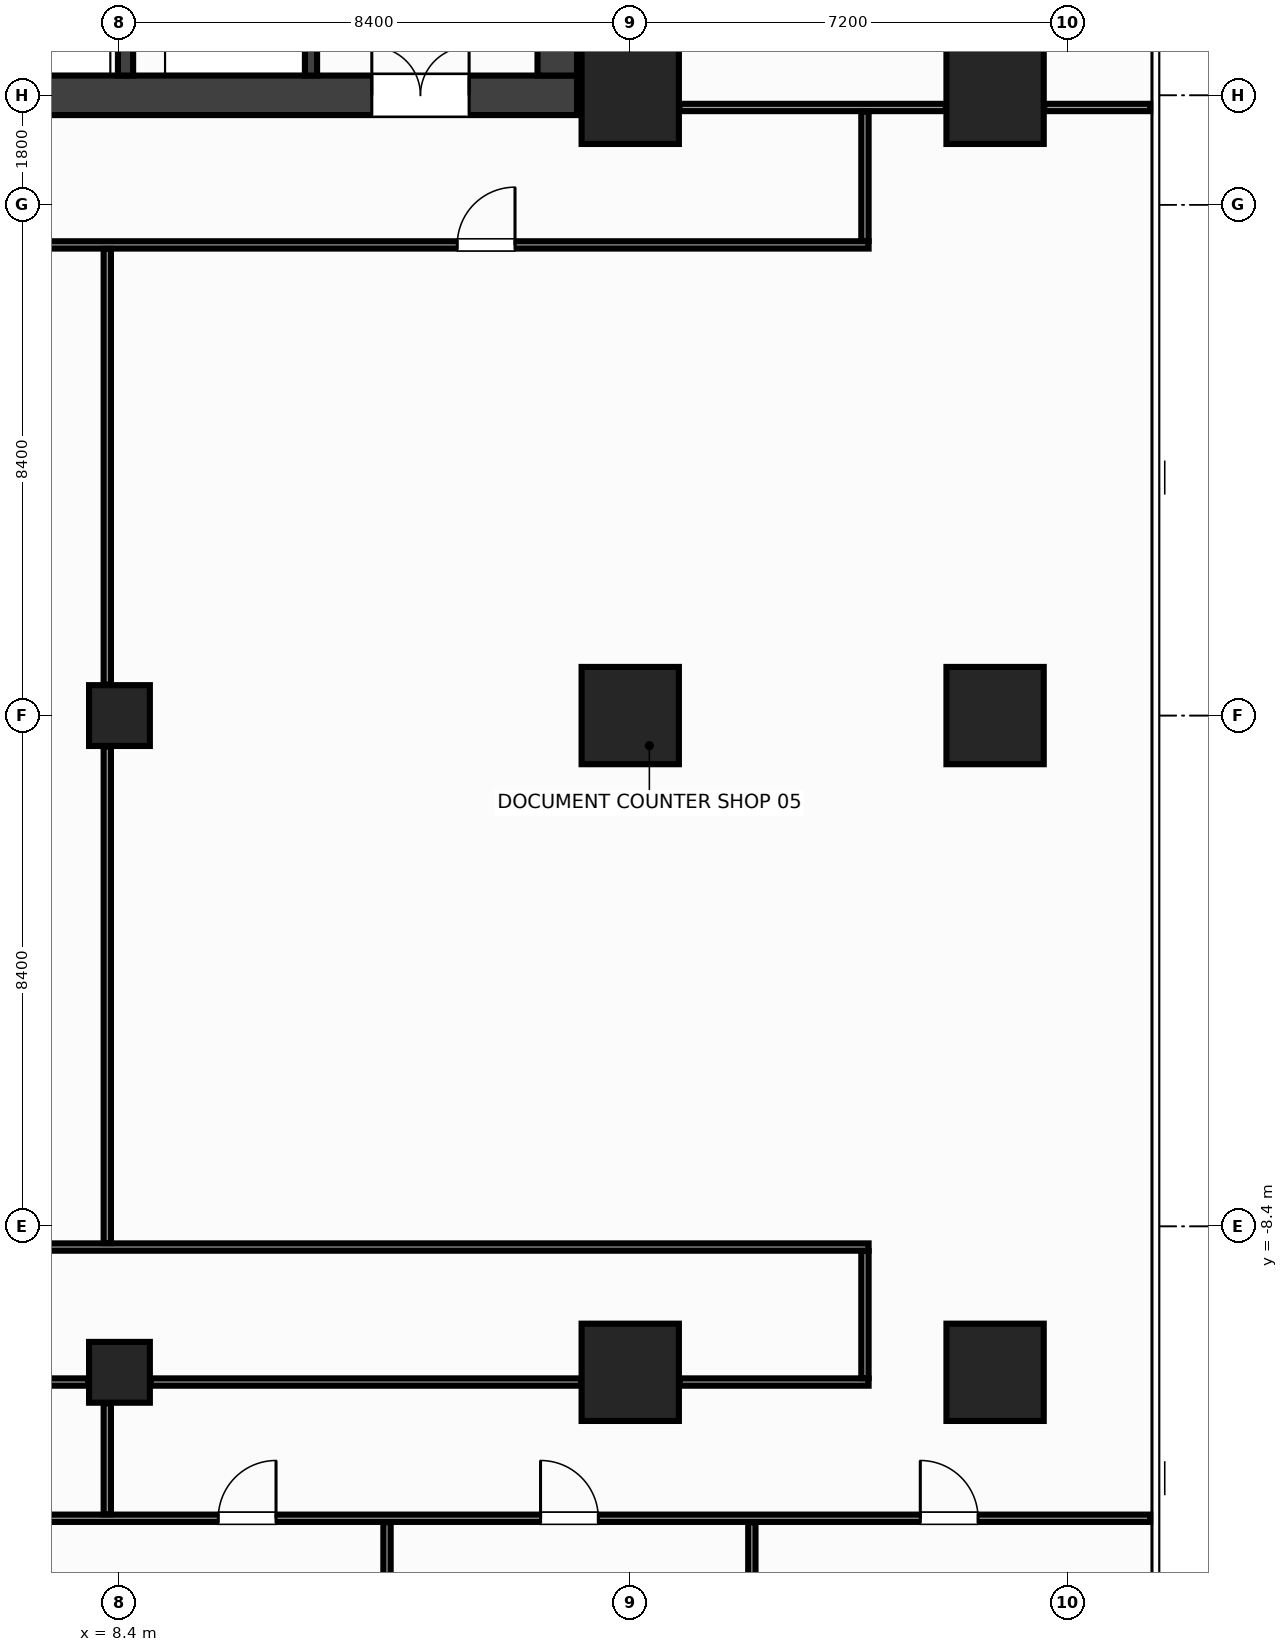
"""IFC4 building model, lengths in metres.
Left out: names, types, materials, properties, quantities, classifications, styles, units other than length and angle.
Written with IfcOpenShell. Run it as: python <this file> out.ifc"""

import sys

from ifc_helpers import new_model, si_unit, direction, frame, frame_2d, origin, origin_2d, place, context, subcontext, project, spatial, rectangle, hollow_rectangle, extrude, source, transform, mapped, element, fill, save


model = new_model("IFC4")
c1 = context("Model", 3, precision=1e-05, world=origin(), true_north=direction((0.0, 1.0)))
c2 = subcontext(c1, "Body", "Model", "MODEL_VIEW")
j1 = project(units=[si_unit("LENGTHUNIT", "METRE"), si_unit("PLANEANGLEUNIT", "RADIAN")], contexts=[c1])
p1 = place(None, origin())
s1 = spatial("IfcSite", under=j1, at=p1, CompositionType="ELEMENT")
p2 = place(p1, origin())
s2 = spatial("IfcBuilding", under=s1, at=p2, CompositionType="ELEMENT")
p3 = place(p2, frame((0.0, 0.0, 84.8)))
s3 = spatial("IfcBuildingStorey", under=s2, at=p3, CompositionType="ELEMENT", Elevation=84.8)
m1 = source(origin(), c2, "Body", "SweptSolid", [
    extrude(rectangle(XDim=31.85, YDim=0.65, at=frame_2d((15.925, 0.0))), origin(), (0.0, 0.0, 1.0), 3.6),
])
p4 = place(p3, frame((-15.925, 10.2, 0.0), z_axis=(0.0, 0.0, 1.0), x_axis=(1.0, 0.0, 0.0)))
e1 = element("IfcWall", 1, at=p4, inside=s3, PredefinedType="SHEAR", context=c2, shape_type="MappedRepresentation", body=[
    mapped(m1, transform((0.0, 0.0, 0.0), x_axis=(1.0, 0.0, 0.0), y_axis=(0.0, 1.0, 0.0), z_axis=(0.0, 0.0, 1.0), scale=1.0)),
])
p5 = place(p4, frame((1.775, 0.0, 0.0)))
e2 = element("IfcOpeningElement", 2, at=p5, cuts=e1, PredefinedType="OPENING", context=c2, shape_type="SweptSolid", body=[
    extrude(rectangle(XDim=1.6, YDim=2.15, at=frame_2d((0.8, 1.075))), frame((0.0, 0.337, 0.0), z_axis=(0.0, -1.0, 0.0), x_axis=(1.0, 0.0, 0.0)), (0.0, 0.0, 1.0), 0.674),
])
p6 = place(p4, frame((28.475, 0.0, 0.0)))
e3 = element("IfcOpeningElement", 3, at=p6, cuts=e1, PredefinedType="OPENING", context=c2, shape_type="SweptSolid", body=[
    extrude(rectangle(XDim=1.6, YDim=2.15, at=frame_2d((0.8, 1.075))), frame((0.0, 0.337, 0.0), z_axis=(0.0, -1.0, 0.0), x_axis=(1.0, 0.0, 0.0)), (0.0, 0.0, 1.0), 0.674),
])
p7 = place(p4, frame((15.175, 0.0, 0.0)))
e4 = element("IfcOpeningElement", 4, at=p7, cuts=e1, PredefinedType="OPENING", context=c2, shape_type="SweptSolid", body=[
    extrude(rectangle(XDim=1.5, YDim=2.2, at=frame_2d((0.75, 1.1))), frame((0.0, 0.337, 0.0), z_axis=(0.0, -1.0, 0.0), x_axis=(1.0, 0.0, 0.0)), (0.0, 0.0, 1.0), 0.674),
])
m2 = source(origin(), c2, "Body", "SweptSolid", [
    extrude(rectangle(XDim=12.95, YDim=0.65, at=frame_2d((6.475, 0.0))), origin(), (0.0, 0.0, 1.0), 3.6),
])
p8 = place(p3, frame((15.6, 10.525, 0.0), z_axis=(0.0, 0.0, 1.0), x_axis=(0.0, 1.0, 0.0)))
e5 = element("IfcWall", 5, at=p8, inside=s3, PredefinedType="SHEAR", context=c2, shape_type="MappedRepresentation", body=[
    mapped(m2, transform((0.0, 0.0, 0.0), x_axis=(1.0, 0.0, 0.0), y_axis=(0.0, 1.0, 0.0), z_axis=(0.0, 0.0, 1.0), scale=1.0)),
])
m3 = source(origin(), c2, "Body", "SweptSolid", [
    extrude(rectangle(XDim=12.95, YDim=0.25, at=frame_2d((6.475, 0.0))), origin(), (0.0, 0.0, 1.0), 3.6),
])
p9 = place(p3, frame((8.5, 10.525, 0.0), z_axis=(0.0, 0.0, 1.0), x_axis=(0.0, 1.0, 0.0)))
e6 = element("IfcWall", 6, at=p9, inside=s3, PredefinedType="SHEAR", context=c2, shape_type="MappedRepresentation", body=[
    mapped(m3, transform((0.0, 0.0, 0.0), x_axis=(1.0, 0.0, 0.0), y_axis=(0.0, 1.0, 0.0), z_axis=(0.0, 0.0, 1.0), scale=1.0)),
])
p10 = place(p9, frame((9.925, 0.0, 0.0)))
e7 = element("IfcOpeningElement", 7, at=p10, cuts=e6, PredefinedType="OPENING", context=c2, shape_type="SweptSolid", body=[
    extrude(rectangle(XDim=0.95, YDim=2.15, at=frame_2d((0.475, 1.075))), frame((0.0, 0.137, 0.0), z_axis=(0.0, -1.0, 0.0), x_axis=(1.0, 0.0, 0.0)), (0.0, 0.0, 1.0), 0.274),
])
m4 = source(origin(), c2, "Body", "SweptSolid", [
    extrude(rectangle(XDim=3.125, YDim=0.2, at=frame_2d((1.562, 0.0))), origin(), (0.0, 0.0, 1.0), 3.6),
])
p11 = place(p3, frame((11.55, 10.525, 0.0), z_axis=(0.0, 0.0, 1.0), x_axis=(0.0, 1.0, 0.0)))
e8 = element("IfcWall", 8, at=p11, inside=s3, PredefinedType="SHEAR", context=c2, shape_type="MappedRepresentation", body=[
    mapped(m4, transform((0.0, 0.0, 0.0), x_axis=(1.0, 0.0, 0.0), y_axis=(0.0, 1.0, 0.0), z_axis=(0.0, 0.0, 1.0), scale=1.0)),
])
p12 = place(p11, frame((0.9, 0.0, 0.0)))
e9 = element("IfcOpeningElement", 9, at=p12, cuts=e8, PredefinedType="OPENING", context=c2, shape_type="SweptSolid", body=[
    extrude(rectangle(XDim=1.1, YDim=2.15, at=frame_2d((0.55, 1.075))), frame((0.0, 0.112, 0.0), z_axis=(0.0, -1.0, 0.0), x_axis=(1.0, 0.0, 0.0)), (0.0, 0.0, 1.0), 0.224),
])
m5 = source(origin(), c2, "Body", "SweptSolid", [
    extrude(rectangle(XDim=1.6, YDim=1.6, at=origin_2d()), origin(), (0.0, 0.0, 1.0), 3.6),
])
for number, where, z_axis, x_axis in (
    (10, (16.8, -10.8, 0.0), (0.0, 0.0, 1.0), (1.0, 0.0, 0.0)),
    (11, (16.8, 0.0, 0.0), (0.0, 0.0, 1.0), (1.0, 0.0, 0.0)),
    (12, (16.8, 10.2, 0.0), (0.0, 0.0, 1.0), (1.0, 0.0, 0.0)),
    (13, (22.8, -10.8, 0.0), (0.0, 0.0, 1.0), (1.0, 0.0, 0.0)),
    (14, (22.8, 0.0, 0.0), (0.0, 0.0, 1.0), (1.0, 0.0, 0.0)),
    (15, (22.8, 10.2, 0.0), (0.0, 0.0, 1.0), (1.0, 0.0, 0.0)),
):
    element("IfcColumn", number, at=place(p3, frame(where, z_axis=z_axis, x_axis=x_axis)), inside=s3, PredefinedType="COLUMN", context=c2, shape_type="MappedRepresentation", body=[
        mapped(m5, transform((0.0, 0.0, 0.0), x_axis=(1.0, 0.0, 0.0), y_axis=(0.0, 1.0, 0.0), z_axis=(0.0, 0.0, 1.0), scale=1.0)),
    ])
m6 = source(origin(), c2, "Body", "SweptSolid", [
    extrude(hollow_rectangle(XDim=1.0, YDim=1.0, WallThickness=0.045, at=origin_2d()), origin(), (0.0, 0.0, 1.0), 3.6),
])
for number, where, z_axis, x_axis in (
    (16, (8.4, 0.0, 0.0), (0.0, 0.0, 1.0), (1.0, 0.0, 0.0)),
    (17, (8.4, -10.8, 0.0), (0.0, 0.0, 1.0), (1.0, 0.0, 0.0)),
):
    element("IfcColumn", number, at=place(p3, frame(where, z_axis=z_axis, x_axis=x_axis)), inside=s3, PredefinedType="COLUMN", context=c2, shape_type="MappedRepresentation", body=[
        mapped(m6, transform((0.0, 0.0, 0.0), x_axis=(1.0, 0.0, 0.0), y_axis=(0.0, 1.0, 0.0), z_axis=(0.0, 0.0, 1.0), scale=1.0)),
    ])
m7 = source(origin(), c2, "Body", "SweptSolid", [
    extrude(rectangle(XDim=4.38, YDim=0.12, at=frame_2d((2.19, 0.0))), origin(), (0.0, 0.0, 1.0), 2.745),
])
p13 = place(p3, frame((17.61, 10.0, 0.0), z_axis=(0.0, 0.0, 1.0), x_axis=(1.0, 0.0, 0.0)))
e18 = element("IfcWall", 18, at=p13, inside=s3, PredefinedType="PARTITIONING", context=c2, shape_type="MappedRepresentation", body=[
    mapped(m7, transform((0.0, 0.0, 0.0), x_axis=(1.0, 0.0, 0.0), y_axis=(0.0, 1.0, 0.0), z_axis=(0.0, 0.0, 1.0), scale=1.0)),
])
m8 = source(origin(), c2, "Body", "SweptSolid", [
    extrude(rectangle(XDim=1.74, YDim=0.12, at=frame_2d((0.87, 0.0))), origin(), (0.0, 0.0, 1.0), 3.36),
])
p14 = place(p3, frame((23.61, 10.0, 0.0), z_axis=(0.0, 0.0, 1.0), x_axis=(1.0, 0.0, 0.0)))
e19 = element("IfcWall", 19, at=p14, inside=s3, PredefinedType="PARTITIONING", context=c2, shape_type="MappedRepresentation", body=[
    mapped(m8, transform((0.0, 0.0, 0.0), x_axis=(1.0, 0.0, 0.0), y_axis=(0.0, 1.0, 0.0), z_axis=(0.0, 0.0, 1.0), scale=1.0)),
])
m9 = source(origin(), c2, "Body", "SweptSolid", [
    extrude(rectangle(XDim=22.3, YDim=0.12, at=frame_2d((11.15, 0.0))), origin(), (0.0, 0.0, 1.0), 2.745),
])
p15 = place(p3, frame((-1.58, 7.74, 0.0), z_axis=(0.0, 0.0, 1.0), x_axis=(1.0, 0.0, 0.0)))
e20 = element("IfcWall", 20, at=p15, inside=s3, PredefinedType="PARTITIONING", context=c2, shape_type="MappedRepresentation", body=[
    mapped(m9, transform((0.0, 0.0, 0.0), x_axis=(1.0, 0.0, 0.0), y_axis=(0.0, 1.0, 0.0), z_axis=(0.0, 0.0, 1.0), scale=1.0)),
])
p16 = place(p15, frame((4.445, 0.0, 0.0)))
e21 = element("IfcOpeningElement", 21, at=p16, cuts=e20, PredefinedType="OPENING", context=c2, shape_type="SweptSolid", body=[
    extrude(rectangle(XDim=0.95, YDim=2.15, at=frame_2d((0.475, 1.075))), frame((0.0, 0.072, 0.0), z_axis=(0.0, -1.0, 0.0), x_axis=(1.0, 0.0, 0.0)), (0.0, 0.0, 1.0), 0.144),
])
p17 = place(p15, frame((15.535, 0.0, 0.0)))
e22 = element("IfcOpeningElement", 22, at=p17, cuts=e20, PredefinedType="OPENING", context=c2, shape_type="SweptSolid", body=[
    extrude(rectangle(XDim=0.95, YDim=2.15, at=frame_2d((0.475, 1.075))), frame((0.0, 0.072, 0.0), z_axis=(0.0, -1.0, 0.0), x_axis=(1.0, 0.0, 0.0)), (0.0, 0.0, 1.0), 0.144),
])
p18 = place(p3, frame((-1.58, -8.74, 0.0), z_axis=(0.0, 0.0, 1.0), x_axis=(1.0, 0.0, 0.0)))
e23 = element("IfcWall", 23, at=p18, inside=s3, PredefinedType="PARTITIONING", context=c2, shape_type="MappedRepresentation", body=[
    mapped(m9, transform((0.0, 0.0, 0.0), x_axis=(1.0, 0.0, 0.0), y_axis=(0.0, 1.0, 0.0), z_axis=(0.0, 0.0, 1.0), scale=1.0)),
])
m10 = source(origin(), c2, "Body", "SweptSolid", [
    extrude(rectangle(XDim=7.38, YDim=0.12, at=frame_2d((3.69, 0.0))), origin(), (0.0, 0.0, 1.0), 2.745),
])
p19 = place(p3, frame((0.51, -10.96, 0.0), z_axis=(0.0, 0.0, 1.0), x_axis=(1.0, 0.0, 0.0)))
e24 = element("IfcWall", 24, at=p19, inside=s3, PredefinedType="PARTITIONING", context=c2, shape_type="MappedRepresentation", body=[
    mapped(m10, transform((0.0, 0.0, 0.0), x_axis=(1.0, 0.0, 0.0), y_axis=(0.0, 1.0, 0.0), z_axis=(0.0, 0.0, 1.0), scale=1.0)),
])
m11 = source(origin(), c2, "Body", "SweptSolid", [
    extrude(rectangle(XDim=7.08, YDim=0.12, at=frame_2d((3.54, 0.0))), origin(), (0.0, 0.0, 1.0), 2.745),
])
p20 = place(p3, frame((8.91, -10.96, 0.0), z_axis=(0.0, 0.0, 1.0), x_axis=(1.0, 0.0, 0.0)))
e25 = element("IfcWall", 25, at=p20, inside=s3, PredefinedType="PARTITIONING", context=c2, shape_type="MappedRepresentation", body=[
    mapped(m11, transform((0.0, 0.0, 0.0), x_axis=(1.0, 0.0, 0.0), y_axis=(0.0, 1.0, 0.0), z_axis=(0.0, 0.0, 1.0), scale=1.0)),
])
m12 = source(origin(), c2, "Body", "SweptSolid", [
    extrude(rectangle(XDim=3.11, YDim=0.12, at=frame_2d((1.555, 0.0))), origin(), (0.0, 0.0, 1.0), 2.745),
])
p21 = place(p3, frame((17.61, -10.96, 0.0), z_axis=(0.0, 0.0, 1.0), x_axis=(1.0, 0.0, 0.0)))
e26 = element("IfcWall", 26, at=p21, inside=s3, PredefinedType="PARTITIONING", context=c2, shape_type="MappedRepresentation", body=[
    mapped(m12, transform((0.0, 0.0, 0.0), x_axis=(1.0, 0.0, 0.0), y_axis=(0.0, 1.0, 0.0), z_axis=(0.0, 0.0, 1.0), scale=1.0)),
])
m13 = source(origin(), c2, "Body", "SweptSolid", [
    extrude(rectangle(XDim=2.13, YDim=0.12, at=frame_2d((1.065, 0.0))), origin(), (0.0, 0.0, 1.0), 3.36),
])
p22 = place(p3, frame((20.66, 7.805, 0.0), z_axis=(0.0, 0.0, 1.0), x_axis=(0.0, 1.0, 0.0)))
e27 = element("IfcWall", 27, at=p22, inside=s3, PredefinedType="PARTITIONING", context=c2, shape_type="MappedRepresentation", body=[
    mapped(m13, transform((0.0, 0.0, 0.0), x_axis=(1.0, 0.0, 0.0), y_axis=(0.0, 1.0, 0.0), z_axis=(0.0, 0.0, 1.0), scale=1.0)),
])
m14 = source(origin(), c2, "Body", "SweptSolid", [
    extrude(rectangle(XDim=2.09, YDim=0.12, at=frame_2d((1.045, 0.0))), origin(), (0.0, 0.0, 1.0), 3.36),
])
p23 = place(p3, frame((20.66, -10.895, 0.0), z_axis=(0.0, 0.0, 1.0), x_axis=(0.0, 1.0, 0.0)))
e28 = element("IfcWall", 28, at=p23, inside=s3, PredefinedType="PARTITIONING", context=c2, shape_type="MappedRepresentation", body=[
    mapped(m14, transform((0.0, 0.0, 0.0), x_axis=(1.0, 0.0, 0.0), y_axis=(0.0, 1.0, 0.0), z_axis=(0.0, 0.0, 1.0), scale=1.0)),
])
m15 = source(origin(), c2, "Body", "SweptSolid", [
    extrude(rectangle(XDim=50.7, YDim=0.12, at=frame_2d((25.35, 0.0))), origin(), (0.0, 0.0, 1.0), 2.945),
])
p24 = place(p3, frame((-25.35, -13.2, 0.0), z_axis=(0.0, 0.0, 1.0), x_axis=(1.0, 0.0, 0.0)))
e29 = element("IfcWall", 29, at=p24, inside=s3, PredefinedType="PARTITIONING", context=c2, shape_type="MappedRepresentation", body=[
    mapped(m15, transform((0.0, 0.0, 0.0), x_axis=(1.0, 0.0, 0.0), y_axis=(0.0, 1.0, 0.0), z_axis=(0.0, 0.0, 1.0), scale=1.0)),
])
p25 = place(p24, frame((46.92, 0.0, 0.0)))
e30 = element("IfcOpeningElement", 30, at=p25, cuts=e29, PredefinedType="OPENING", context=c2, shape_type="SweptSolid", body=[
    extrude(rectangle(XDim=0.95, YDim=2.15, at=frame_2d((0.475, 1.075))), frame((0.0, 0.072, 0.0), z_axis=(0.0, -1.0, 0.0), x_axis=(1.0, 0.0, 0.0)), (0.0, 0.0, 1.0), 0.144),
])
p26 = place(p24, frame((2.73, 0.0, 0.0)))
e31 = element("IfcOpeningElement", 31, at=p26, cuts=e29, PredefinedType="OPENING", context=c2, shape_type="SweptSolid", body=[
    extrude(rectangle(XDim=0.95, YDim=2.15, at=frame_2d((0.475, 1.075))), frame((0.0, 0.072, 0.0), z_axis=(0.0, -1.0, 0.0), x_axis=(1.0, 0.0, 0.0)), (0.0, 0.0, 1.0), 0.144),
])
p27 = place(p24, frame((9.375, 0.0, 0.0)))
e32 = element("IfcOpeningElement", 32, at=p27, cuts=e29, PredefinedType="OPENING", context=c2, shape_type="SweptSolid", body=[
    extrude(rectangle(XDim=0.95, YDim=2.15, at=frame_2d((0.475, 1.075))), frame((0.0, 0.072, 0.0), z_axis=(0.0, -1.0, 0.0), x_axis=(1.0, 0.0, 0.0)), (0.0, 0.0, 1.0), 0.144),
])
p28 = place(p24, frame((15.875, 0.0, 0.0)))
e33 = element("IfcOpeningElement", 33, at=p28, cuts=e29, PredefinedType="OPENING", context=c2, shape_type="SweptSolid", body=[
    extrude(rectangle(XDim=0.95, YDim=2.15, at=frame_2d((0.475, 1.075))), frame((0.0, 0.072, 0.0), z_axis=(0.0, -1.0, 0.0), x_axis=(1.0, 0.0, 0.0)), (0.0, 0.0, 1.0), 0.144),
])
p29 = place(p24, frame((24.875, 0.0, 0.0)))
e34 = element("IfcOpeningElement", 34, at=p29, cuts=e29, PredefinedType="OPENING", context=c2, shape_type="SweptSolid", body=[
    extrude(rectangle(XDim=0.95, YDim=2.15, at=frame_2d((0.475, 1.075))), frame((0.0, 0.072, 0.0), z_axis=(0.0, -1.0, 0.0), x_axis=(1.0, 0.0, 0.0)), (0.0, 0.0, 1.0), 0.144),
])
p30 = place(p24, frame((35.375, 0.0, 0.0)))
e35 = element("IfcOpeningElement", 35, at=p30, cuts=e29, PredefinedType="OPENING", context=c2, shape_type="SweptSolid", body=[
    extrude(rectangle(XDim=0.95, YDim=2.15, at=frame_2d((0.475, 1.075))), frame((0.0, 0.072, 0.0), z_axis=(0.0, -1.0, 0.0), x_axis=(1.0, 0.0, 0.0)), (0.0, 0.0, 1.0), 0.144),
])
p31 = place(p24, frame((40.675, 0.0, 0.0)))
e36 = element("IfcOpeningElement", 36, at=p31, cuts=e29, PredefinedType="OPENING", context=c2, shape_type="SweptSolid", body=[
    extrude(rectangle(XDim=0.95, YDim=2.15, at=frame_2d((0.475, 1.075))), frame((0.0, 0.072, 0.0), z_axis=(0.0, -1.0, 0.0), x_axis=(1.0, 0.0, 0.0)), (0.0, 0.0, 1.0), 0.144),
])
m16 = source(origin(), c2, "Body", "SweptSolid", [
    extrude(rectangle(XDim=1.825, YDim=0.12, at=frame_2d((0.913, 0.0))), origin(), (0.0, 0.0, 1.0), 2.945),
])
p32 = place(p3, frame((8.2, -13.135, 0.0), z_axis=(0.0, 0.0, 1.0), x_axis=(0.0, 1.0, 0.0)))
e37 = element("IfcWall", 37, at=p32, inside=s3, PredefinedType="PARTITIONING", context=c2, shape_type="MappedRepresentation", body=[
    mapped(m16, transform((0.0, 0.0, 0.0), x_axis=(1.0, 0.0, 0.0), y_axis=(0.0, 1.0, 0.0), z_axis=(0.0, 0.0, 1.0), scale=1.0)),
])
m17 = source(origin(), c2, "Body", "SweptSolid", [
    extrude(rectangle(XDim=8.165, YDim=0.12, at=frame_2d((4.083, 0.0))), origin(), (0.0, 0.0, 1.0), 2.745),
])
p33 = place(p3, frame((8.2, -8.675, 0.0), z_axis=(0.0, 0.0, 1.0), x_axis=(0.0, 1.0, 0.0)))
e38 = element("IfcWall", 38, at=p33, inside=s3, PredefinedType="PARTITIONING", context=c2, shape_type="MappedRepresentation", body=[
    mapped(m17, transform((0.0, 0.0, 0.0), x_axis=(1.0, 0.0, 0.0), y_axis=(0.0, 1.0, 0.0), z_axis=(0.0, 0.0, 1.0), scale=1.0)),
])
m18 = source(origin(), c2, "Body", "SweptSolid", [
    extrude(rectangle(XDim=7.165, YDim=0.12, at=frame_2d((3.583, 0.0))), origin(), (0.0, 0.0, 1.0), 2.645),
])
p34 = place(p3, frame((8.2, 0.51, 0.0), z_axis=(0.0, 0.0, 1.0), x_axis=(0.0, 1.0, 0.0)))
e39 = element("IfcWall", 39, at=p34, inside=s3, PredefinedType="PARTITIONING", context=c2, shape_type="MappedRepresentation", body=[
    mapped(m18, transform((0.0, 0.0, 0.0), x_axis=(1.0, 0.0, 0.0), y_axis=(0.0, 1.0, 0.0), z_axis=(0.0, 0.0, 1.0), scale=1.0)),
])
m19 = source(origin(), c2, "Body", "SweptSolid", [
    extrude(rectangle(XDim=12.385, YDim=0.12, at=frame_2d((6.192, 0.0))), origin(), (0.0, 0.0, 1.0), 2.745),
])
for number, where, z_axis, x_axis in (
    (40, (12.8, -25.65, 0.0), (0.0, 0.0, 1.0), (0.0, 1.0, 0.0)),
    (41, (18.8, -25.65, 0.0), (0.0, 0.0, 1.0), (0.0, 1.0, 0.0)),
):
    element("IfcWall", number, at=place(p3, frame(where, z_axis=z_axis, x_axis=x_axis)), inside=s3, PredefinedType="PARTITIONING", context=c2, shape_type="MappedRepresentation", body=[
        mapped(m19, transform((0.0, 0.0, 0.0), x_axis=(1.0, 0.0, 0.0), y_axis=(0.0, 1.0, 0.0), z_axis=(0.0, 0.0, 1.0), scale=1.0)),
    ])
m20 = source(origin(), c2, "Body", "SweptSolid", [
    extrude(rectangle(XDim=1.6, YDim=2.15, at=frame_2d((0.8, 1.075))), frame((0.0, 0.025, 0.0), z_axis=(0.0, -1.0, 0.0), x_axis=(1.0, 0.0, 0.0)), (0.0, 0.0, 1.0), 0.05),
])
p35 = place(p6, origin())
e42 = element("IfcDoor", 42, at=p35, inside=s3, OperationType="DOUBLE_DOOR_SINGLE_SWING", PredefinedType="DOOR", context=c2, shape_type="MappedRepresentation", body=[
    mapped(m20, transform((0.0, 0.0, 0.0), x_axis=(1.0, 0.0, 0.0), y_axis=(0.0, 1.0, 0.0), z_axis=(0.0, 0.0, 1.0), scale=1.0)),
])
fill(e3, e42)
m21 = source(origin(), c2, "Body", "SweptSolid", [
    extrude(rectangle(XDim=0.95, YDim=2.15, at=frame_2d((0.475, 1.075))), frame((0.0, 0.025, 0.0), z_axis=(0.0, -1.0, 0.0), x_axis=(1.0, 0.0, 0.0)), (0.0, 0.0, 1.0), 0.05),
])
p36 = place(p17, origin())
e43 = element("IfcDoor", 43, at=p36, inside=s3, OperationType="SINGLE_SWING_RIGHT", PredefinedType="DOOR", context=c2, shape_type="MappedRepresentation", body=[
    mapped(m21, transform((0.0, 0.0, 0.0), x_axis=(1.0, 0.0, 0.0), y_axis=(0.0, 1.0, 0.0), z_axis=(0.0, 0.0, 1.0), scale=1.0)),
])
fill(e22, e43)
p37 = place(p25, origin())
e44 = element("IfcDoor", 44, at=p37, inside=s3, OperationType="SINGLE_SWING_LEFT", PredefinedType="DOOR", context=c2, shape_type="MappedRepresentation", body=[
    mapped(m21, transform((0.0, 0.0, 0.0), x_axis=(1.0, 0.0, 0.0), y_axis=(0.0, 1.0, 0.0), z_axis=(0.0, 0.0, 1.0), scale=1.0)),
])
fill(e30, e44)
p38 = place(p30, origin())
e45 = element("IfcDoor", 45, at=p38, inside=s3, OperationType="SINGLE_SWING_RIGHT", PredefinedType="DOOR", context=c2, shape_type="MappedRepresentation", body=[
    mapped(m21, transform((0.0, 0.0, 0.0), x_axis=(1.0, 0.0, 0.0), y_axis=(0.0, 1.0, 0.0), z_axis=(0.0, 0.0, 1.0), scale=1.0)),
])
fill(e35, e45)
p39 = place(p31, origin())
e46 = element("IfcDoor", 46, at=p39, inside=s3, OperationType="SINGLE_SWING_LEFT", PredefinedType="DOOR", context=c2, shape_type="MappedRepresentation", body=[
    mapped(m21, transform((0.0, 0.0, 0.0), x_axis=(1.0, 0.0, 0.0), y_axis=(0.0, 1.0, 0.0), z_axis=(0.0, 0.0, 1.0), scale=1.0)),
])
fill(e36, e46)
save(model, sys.argv[1])
